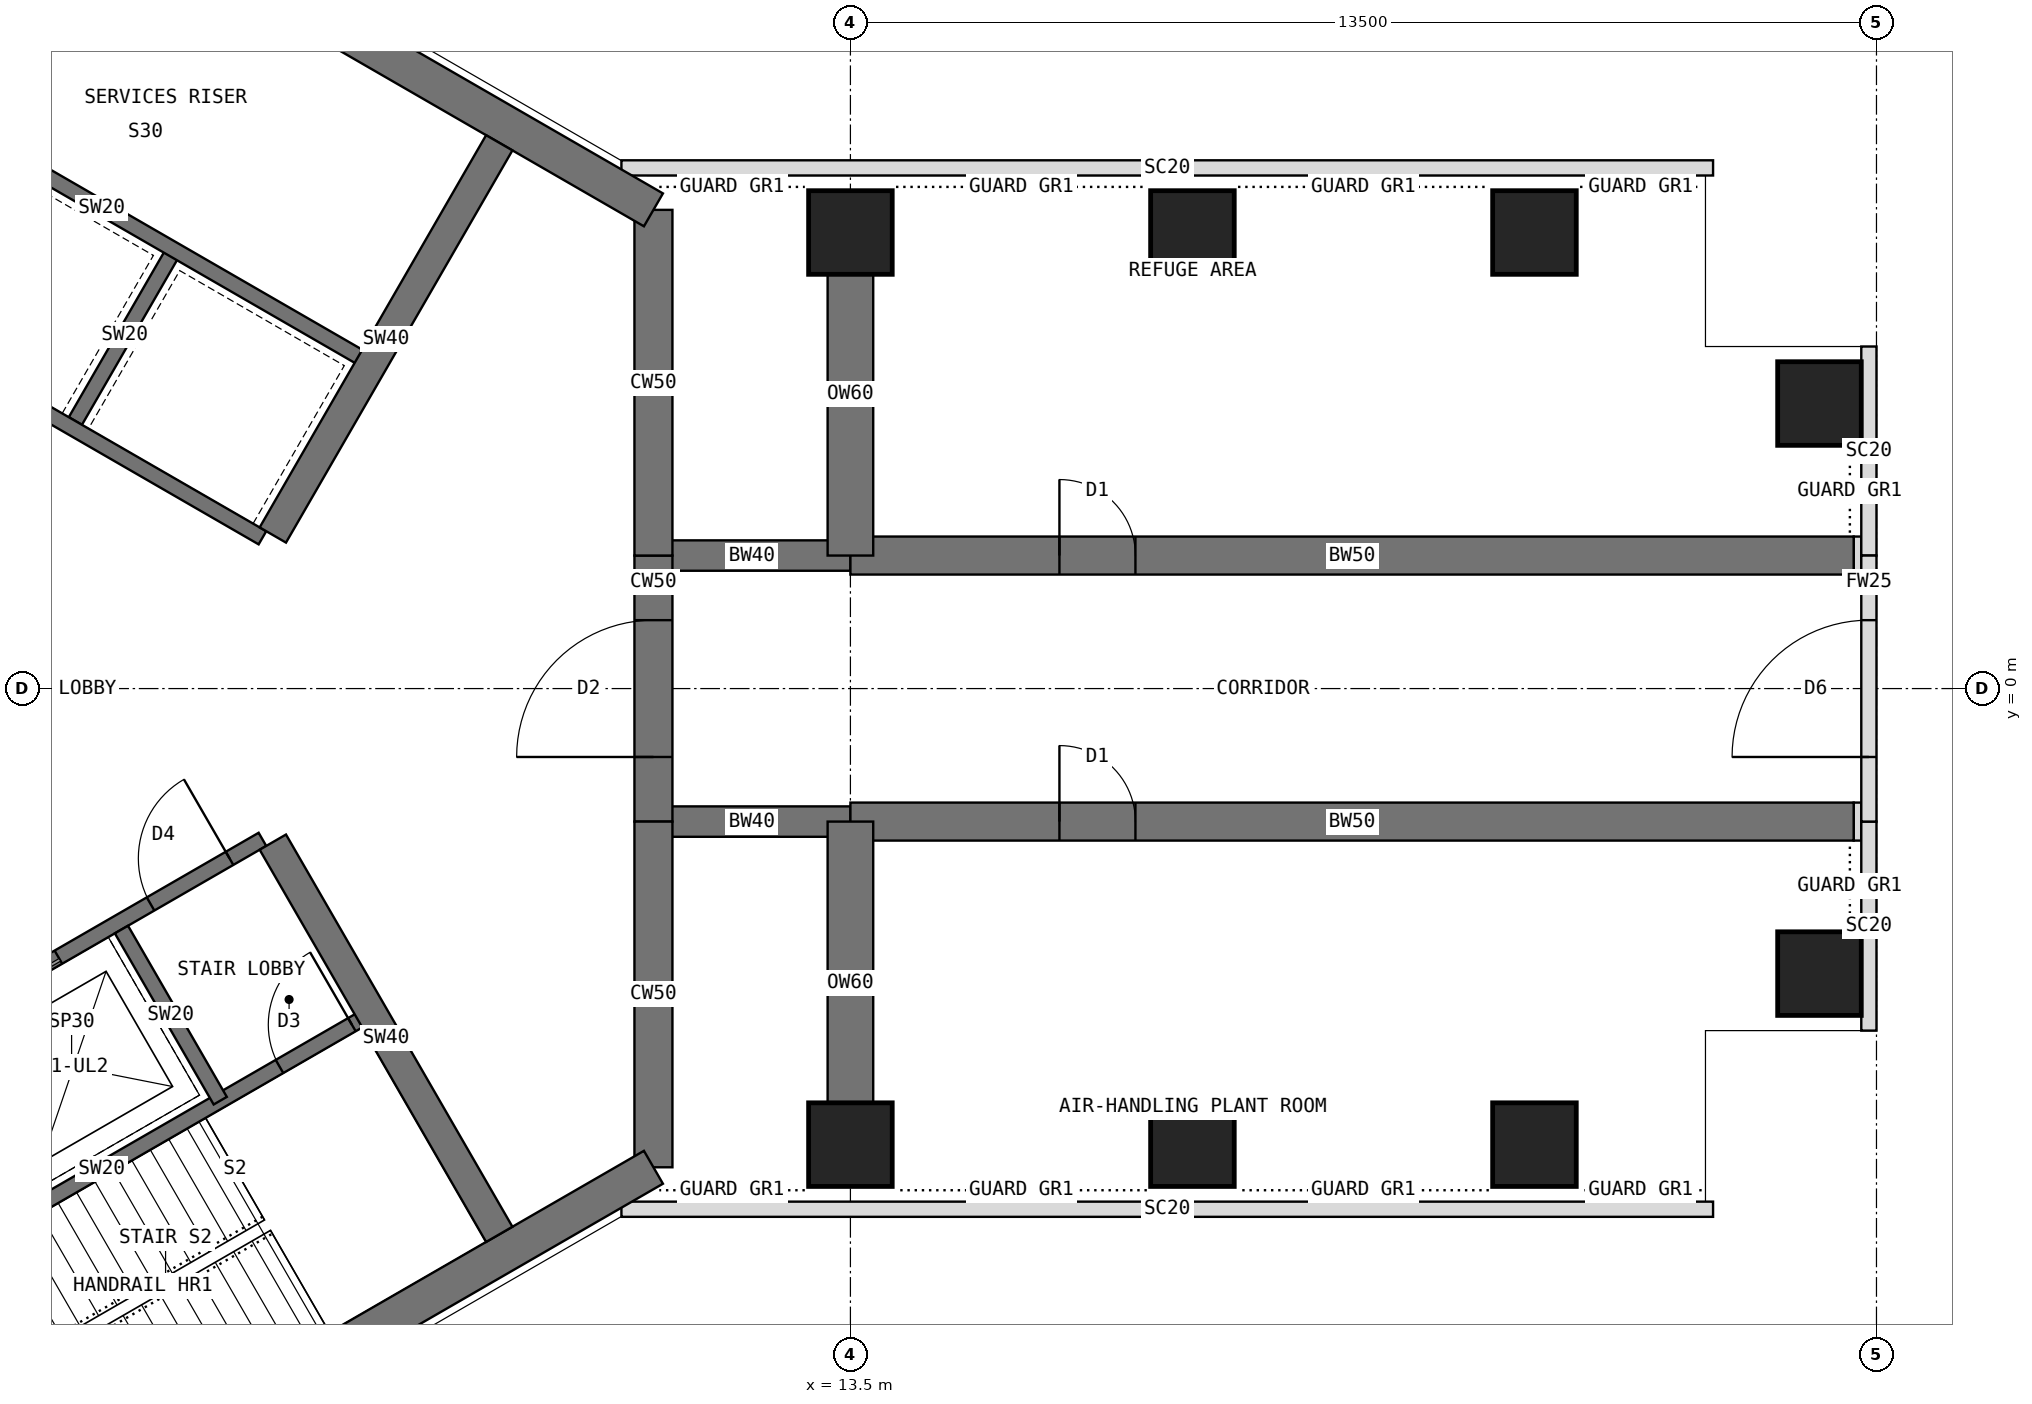
"""IFC4 building model, lengths in metres.
Left out: names, types, materials, properties, quantities, classifications, styles, units other than length and angle.
Written with IfcOpenShell. Run it as: python <this file> out.ifc"""

import sys

from ifc_helpers import new_model, si_unit, direction, frame, frame_2d, origin, origin_2d, place, context, subcontext, project, spatial, rectangle, extrude, element, fill, save


model = new_model("IFC4")
c1 = context("Model", 3, precision=1e-05, world=origin(), true_north=direction((0.0, 1.0)))
c2 = subcontext(c1, "Body", "Model", "MODEL_VIEW")
j1 = project(units=[si_unit("LENGTHUNIT", "METRE"), si_unit("PLANEANGLEUNIT", "RADIAN")], contexts=[c1])
p1 = place(None, origin())
s1 = spatial("IfcSite", under=j1, at=p1, CompositionType="ELEMENT")
p2 = place(p1, origin())
s2 = spatial("IfcBuilding", under=s1, at=p2, CompositionType="ELEMENT")
p3 = place(p2, frame((0.0, 0.0, 238.5)))
s3 = spatial("IfcBuildingStorey", under=s2, at=p3, CompositionType="ELEMENT", Elevation=238.5)
p4 = place(p3, frame((10.908, -6.298, 0.0), z_axis=(0.0, 0.0, 1.0), x_axis=(0.0, 1.0, 0.0)))
e1 = element("IfcWall", 1, at=p4, inside=s3, PredefinedType="SHEAR", context=c2, shape_type="SweptSolid", body=[
    extrude(rectangle(XDim=4.548, YDim=0.5, at=frame_2d((2.274, 0.0))), origin(), (0.0, 0.0, 1.0), 5.0),
])
p5 = place(p3, frame((10.908, -1.75, 0.0), z_axis=(0.0, 0.0, 1.0), x_axis=(0.0, 1.0, 0.0)))
e2 = element("IfcWall", 2, at=p5, inside=s3, PredefinedType="SHEAR", context=c2, shape_type="SweptSolid", body=[
    extrude(rectangle(XDim=3.5, YDim=0.5, at=frame_2d((1.75, 0.0))), origin(), (0.0, 0.0, 1.0), 5.0),
])
p6 = place(p5, frame((0.85, 0.0, 0.0)))
e3 = element("IfcOpeningElement", 3, at=p6, cuts=e2, PredefinedType="OPENING", context=c2, shape_type="SweptSolid", body=[
    extrude(rectangle(XDim=1.8, YDim=2.1, at=frame_2d((0.9, 1.05))), frame((0.0, 0.26, 0.0), z_axis=(0.0, -1.0, 0.0), x_axis=(1.0, 0.0, 0.0)), (0.0, 0.0, 1.0), 0.52),
])
p7 = place(p3, frame((10.908, 1.75, 0.0), z_axis=(0.0, 0.0, 1.0), x_axis=(0.0, 1.0, 0.0)))
e4 = element("IfcWall", 4, at=p7, inside=s3, PredefinedType="SHEAR", context=c2, shape_type="SweptSolid", body=[
    extrude(rectangle(XDim=4.548, YDim=0.5, at=frame_2d((2.274, 0.0))), origin(), (0.0, 0.0, 1.0), 5.0),
])
for number, where, z_axis, x_axis in (
    (5, (10.908, 6.298, 0.0), (0.0, 0.0, 1.0), (-0.866, 0.5, 0.0)),
    (6, (0.0, -12.596, 0.0), (0.0, 0.0, 1.0), (0.866, 0.5, 0.0)),
):
    element("IfcWall", number, at=place(p3, frame(where, z_axis=z_axis, x_axis=x_axis)), inside=s3, PredefinedType="SHEAR", context=c2, shape_type="SweptSolid", body=[
        extrude(rectangle(XDim=12.596, YDim=0.5, at=frame_2d((6.298, 0.0))), origin(), (0.0, 0.0, 1.0), 5.0),
    ])
p8 = place(p3, frame((10.908, 1.75, 0.0), z_axis=(0.0, 0.0, 1.0), x_axis=(1.0, 0.0, 0.0)))
e7 = element("IfcWall", 7, at=p8, inside=s3, PredefinedType="SHEAR", context=c2, shape_type="SweptSolid", body=[
    extrude(rectangle(XDim=2.592, YDim=0.4, at=frame_2d((1.296, 0.0))), origin(), (0.0, 0.0, 1.0), 5.0),
])
p9 = place(p3, frame((13.5, 1.75, 0.0), z_axis=(0.0, 0.0, 1.0), x_axis=(1.0, 0.0, 0.0)))
e8 = element("IfcWall", 8, at=p9, inside=s3, PredefinedType="SHEAR", context=c2, shape_type="SweptSolid", body=[
    extrude(rectangle(XDim=13.2, YDim=0.5, at=frame_2d((6.6, 0.0))), origin(), (0.0, 0.0, 1.0), 5.0),
])
p10 = place(p9, frame((2.75, 0.0, 0.0)))
e9 = element("IfcOpeningElement", 9, at=p10, cuts=e8, PredefinedType="OPENING", context=c2, shape_type="SweptSolid", body=[
    extrude(rectangle(XDim=1.0, YDim=2.1, at=frame_2d((0.5, 1.05))), frame((0.0, 0.26, 0.0), z_axis=(0.0, -1.0, 0.0), x_axis=(1.0, 0.0, 0.0)), (0.0, 0.0, 1.0), 0.52),
])
p11 = place(p3, frame((10.908, -1.75, 0.0), z_axis=(0.0, 0.0, 1.0), x_axis=(1.0, 0.0, 0.0)))
e10 = element("IfcWall", 10, at=p11, inside=s3, PredefinedType="SHEAR", context=c2, shape_type="SweptSolid", body=[
    extrude(rectangle(XDim=2.592, YDim=0.4, at=frame_2d((1.296, 0.0))), origin(), (0.0, 0.0, 1.0), 5.0),
])
p12 = place(p3, frame((13.5, -1.75, 0.0), z_axis=(0.0, 0.0, 1.0), x_axis=(1.0, 0.0, 0.0)))
e11 = element("IfcWall", 11, at=p12, inside=s3, PredefinedType="SHEAR", context=c2, shape_type="SweptSolid", body=[
    extrude(rectangle(XDim=13.2, YDim=0.5, at=frame_2d((6.6, 0.0))), origin(), (0.0, 0.0, 1.0), 5.0),
])
p13 = place(p12, frame((2.75, 0.0, 0.0)))
e12 = element("IfcOpeningElement", 12, at=p13, cuts=e11, PredefinedType="OPENING", context=c2, shape_type="SweptSolid", body=[
    extrude(rectangle(XDim=1.0, YDim=2.1, at=frame_2d((0.5, 1.05))), frame((0.0, 0.26, 0.0), z_axis=(0.0, -1.0, 0.0), x_axis=(1.0, 0.0, 0.0)), (0.0, 0.0, 1.0), 0.52),
])
for number, where, z_axis, x_axis in (
    (13, (13.5, 6.0, 0.0), (0.0, 0.0, 1.0), (1.0, 0.0, 0.0)),
    (14, (13.5, -6.0, 0.0), (0.0, 0.0, 1.0), (1.0, 0.0, 0.0)),
    (15, (18.0, 6.0, 0.0), (0.0, 0.0, 1.0), (1.0, 0.0, 0.0)),
    (16, (18.0, -6.0, 0.0), (0.0, 0.0, 1.0), (1.0, 0.0, 0.0)),
    (17, (22.5, 6.0, 0.0), (0.0, 0.0, 1.0), (1.0, 0.0, 0.0)),
    (18, (22.5, -6.0, 0.0), (0.0, 0.0, 1.0), (1.0, 0.0, 0.0)),
    (19, (26.25, 3.75, 0.0), (0.0, 0.0, 1.0), (1.0, 0.0, 0.0)),
    (20, (26.25, -3.75, 0.0), (0.0, 0.0, 1.0), (1.0, 0.0, 0.0)),
):
    element("IfcColumn", number, at=place(p3, frame(where, z_axis=z_axis, x_axis=x_axis)), inside=s3, PredefinedType="COLUMN", context=c2, shape_type="SweptSolid", body=[
        extrude(rectangle(XDim=1.1, YDim=1.1, at=origin_2d()), origin(), (0.0, 0.0, 1.0), 5.0),
    ])
for number, where, z_axis, x_axis in (
    (21, (13.5, 1.75, 0.0), (0.0, 0.0, 1.0), (0.0, 1.0, 0.0)),
    (22, (13.5, -1.75, 0.0), (0.0, 0.0, 1.0), (0.0, -1.0, 0.0)),
):
    element("IfcWall", number, at=place(p3, frame(where, z_axis=z_axis, x_axis=x_axis)), inside=s3, PredefinedType="SHEAR", context=c2, shape_type="SweptSolid", body=[
        extrude(rectangle(XDim=4.25, YDim=0.6, at=frame_2d((2.125, 0.0))), origin(), (0.0, 0.0, 1.0), 5.0),
    ])
for number, where, z_axis, x_axis in (
    (23, (10.487, 6.85, 0.0), (0.0, 0.0, 1.0), (1.0, 0.0, 0.0)),
    (24, (24.85, -6.85, 0.0), (0.0, 0.0, 1.0), (-1.0, 0.0, 0.0)),
):
    element("IfcWall", number, at=place(p3, frame(where, z_axis=z_axis, x_axis=x_axis)), inside=s3, PredefinedType="USERDEFINED", context=c2, shape_type="SweptSolid", body=[
        extrude(rectangle(XDim=14.363, YDim=0.2, at=frame_2d((7.182, 0.0))), origin(), (0.0, 0.0, 1.0), 4.8),
    ])
p14 = place(p3, frame((26.9, -4.5, 0.0), z_axis=(0.0, 0.0, 1.0), x_axis=(0.0, 1.0, 0.0)))
e25 = element("IfcWall", 25, at=p14, inside=s3, PredefinedType="USERDEFINED", context=c2, shape_type="SweptSolid", body=[
    extrude(rectangle(XDim=2.75, YDim=0.2, at=frame_2d((1.375, 0.0))), origin(), (0.0, 0.0, 1.0), 4.8),
])
p15 = place(p3, frame((26.9, -1.75, 0.0), z_axis=(0.0, 0.0, 1.0), x_axis=(0.0, 1.0, 0.0)))
e26 = element("IfcWall", 26, at=p15, inside=s3, PredefinedType="STANDARD", context=c2, shape_type="SweptSolid", body=[
    extrude(rectangle(XDim=3.5, YDim=0.2, at=frame_2d((1.75, 0.0))), origin(), (0.0, 0.0, 1.0), 4.8),
])
p16 = place(p15, frame((0.85, 0.0, 0.0)))
e27 = element("IfcOpeningElement", 27, at=p16, cuts=e26, PredefinedType="OPENING", context=c2, shape_type="SweptSolid", body=[
    extrude(rectangle(XDim=1.8, YDim=2.4, at=frame_2d((0.9, 1.2))), frame((0.0, 0.11, 0.0), z_axis=(0.0, -1.0, 0.0), x_axis=(1.0, 0.0, 0.0)), (0.0, 0.0, 1.0), 0.22),
])
p17 = place(p3, frame((26.9, 1.75, 0.0), z_axis=(0.0, 0.0, 1.0), x_axis=(0.0, 1.0, 0.0)))
e28 = element("IfcWall", 28, at=p17, inside=s3, PredefinedType="USERDEFINED", context=c2, shape_type="SweptSolid", body=[
    extrude(rectangle(XDim=2.75, YDim=0.2, at=frame_2d((1.375, 0.0))), origin(), (0.0, 0.0, 1.0), 4.8),
])
for number, where, z_axis, x_axis in (
    (29, (26.7, 1.75, 0.0), (0.0, 0.0, 1.0), (1.0, 0.0, 0.0)),
    (30, (26.7, -1.75, 0.0), (0.0, 0.0, 1.0), (1.0, 0.0, 0.0)),
):
    element("IfcWall", number, at=place(p3, frame(where, z_axis=z_axis, x_axis=x_axis)), inside=s3, PredefinedType="PARTITIONING", context=c2, shape_type="SweptSolid", body=[
        extrude(rectangle(XDim=0.1, YDim=0.5, at=frame_2d((0.05, 0.0))), origin(), (0.0, 0.0, 1.0), 4.8),
    ])
p18 = place(p3, frame((5.764, 1.984, 0.0), z_axis=(0.0, 0.0, 1.0), x_axis=(-0.866026010844, 0.49999894854, 0.0)))
e31 = element("IfcWall", 31, at=p18, inside=s3, PredefinedType="SHEAR", context=c2, shape_type="SweptSolid", body=[
    extrude(rectangle(XDim=8.0, YDim=0.2, at=frame_2d((4.0, 0.0))), origin(), (0.0, 0.0, 1.0), 5.0),
])
p19 = place(p18, frame((6.3, 0.0, 0.0)))
e32 = element("IfcOpeningElement", 32, at=p19, cuts=e31, PredefinedType="OPENING", context=c2, shape_type="SweptSolid", body=[
    extrude(rectangle(XDim=1.2, YDim=2.1, at=frame_2d((0.6, 1.05))), frame((0.0, 0.11, 0.0), z_axis=(0.0, -1.0, 0.0), x_axis=(1.0, 0.0, 0.0)), (0.0, 0.0, 1.0), 0.22),
])
p20 = place(p3, frame((3.303, 3.52, 0.0), z_axis=(0.0, 0.0, 1.0), x_axis=(0.499936506574, 0.866062058628, 0.0)))
e33 = element("IfcWall", 33, at=p20, inside=s3, PredefinedType="SHEAR", context=c2, shape_type="SweptSolid", body=[
    extrude(rectangle(XDim=2.6, YDim=0.2, at=frame_2d((1.3, 0.0))), origin(), (0.0, 0.0, 1.0), 5.0),
])
p21 = place(p3, frame((7.114, 4.322, 0.0), z_axis=(0.0, 0.0, 1.0), x_axis=(-0.866026010844, 0.49999894854, 0.0)))
e34 = element("IfcWall", 34, at=p21, inside=s3, PredefinedType="SHEAR", context=c2, shape_type="SweptSolid", body=[
    extrude(rectangle(XDim=8.0, YDim=0.2, at=frame_2d((4.0, 0.0))), origin(), (0.0, 0.0, 1.0), 5.0),
])
p22 = place(p21, frame((6.8, 0.0, 0.0)))
e35 = element("IfcOpeningElement", 35, at=p22, cuts=e34, PredefinedType="OPENING", context=c2, shape_type="SweptSolid", body=[
    extrude(rectangle(XDim=0.9, YDim=2.1, at=frame_2d((0.45, 1.05))), frame((0.0, 0.11, 0.0), z_axis=(0.0, -1.0, 0.0), x_axis=(1.0, 0.0, 0.0)), (0.0, 0.0, 1.0), 0.22),
])
p23 = place(p3, frame((5.901, 2.02, 0.0), z_axis=(0.0, 0.0, 1.0), x_axis=(0.500003832394, 0.86602319114, 0.0)))
e36 = element("IfcWall", 36, at=p23, inside=s3, PredefinedType="SHEAR", context=c2, shape_type="SweptSolid", body=[
    extrude(rectangle(XDim=5.958, YDim=0.4, at=frame_2d((2.979, 0.0))), origin(), (0.0, 0.0, 1.0), 5.0),
])
p24 = place(p3, frame((-1.164, -5.984, 0.0), z_axis=(0.0, 0.0, 1.0), x_axis=(0.866026010844, 0.49999894854, 0.0)))
e37 = element("IfcWall", 37, at=p24, inside=s3, PredefinedType="SHEAR", context=c2, shape_type="SweptSolid", body=[
    extrude(rectangle(XDim=8.0, YDim=0.2, at=frame_2d((4.0, 0.0))), origin(), (0.0, 0.0, 1.0), 5.0),
])
p25 = place(p24, frame((6.3, 0.0, 0.0)))
e38 = element("IfcOpeningElement", 38, at=p25, cuts=e37, PredefinedType="OPENING", context=c2, shape_type="SweptSolid", body=[
    extrude(rectangle(XDim=1.2, YDim=2.1, at=frame_2d((0.6, 1.05))), frame((0.0, 0.11, 0.0), z_axis=(0.0, -1.0, 0.0), x_axis=(1.0, 0.0, 0.0)), (0.0, 0.0, 1.0), 0.22),
])
p26 = place(p24, frame((0.9, 0.0, 0.0)))
e39 = element("IfcOpeningElement", 39, at=p26, cuts=e37, PredefinedType="OPENING", context=c2, shape_type="SweptSolid", body=[
    extrude(rectangle(XDim=1.1, YDim=2.2, at=frame_2d((0.55, 1.1))), frame((0.0, 0.11, 0.0), z_axis=(0.0, -1.0, 0.0), x_axis=(1.0, 0.0, 0.0)), (0.0, 0.0, 1.0), 0.22),
])
p27 = place(p24, frame((3.8, 0.0, 0.0)))
e40 = element("IfcOpeningElement", 40, at=p27, cuts=e37, PredefinedType="OPENING", context=c2, shape_type="SweptSolid", body=[
    extrude(rectangle(XDim=1.1, YDim=2.2, at=frame_2d((0.55, 1.1))), frame((0.0, 0.11, 0.0), z_axis=(0.0, -1.0, 0.0), x_axis=(1.0, 0.0, 0.0)), (0.0, 0.0, 1.0), 0.22),
])
p28 = place(p3, frame((3.909, -3.17, 0.0), z_axis=(0.0, 0.0, 1.0), x_axis=(0.49997716683, -0.86603858612, 0.0)))
e41 = element("IfcWall", 41, at=p28, inside=s3, PredefinedType="SHEAR", context=c2, shape_type="SweptSolid", body=[
    extrude(rectangle(XDim=2.6, YDim=0.2, at=frame_2d((1.3, 0.0))), origin(), (0.0, 0.0, 1.0), 5.0),
])
p29 = place(p3, frame((0.186, -8.322, 0.0), z_axis=(0.0, 0.0, 1.0), x_axis=(0.866026010844, 0.49999894854, 0.0)))
e42 = element("IfcWall", 42, at=p29, inside=s3, PredefinedType="SHEAR", context=c2, shape_type="SweptSolid", body=[
    extrude(rectangle(XDim=8.0, YDim=0.2, at=frame_2d((4.0, 0.0))), origin(), (0.0, 0.0, 1.0), 5.0),
])
p30 = place(p29, frame((6.7, 0.0, 0.0)))
e43 = element("IfcOpeningElement", 43, at=p30, cuts=e42, PredefinedType="OPENING", context=c2, shape_type="SweptSolid", body=[
    extrude(rectangle(XDim=1.1, YDim=2.1, at=frame_2d((0.55, 1.05))), frame((0.0, 0.11, 0.0), z_axis=(0.0, -1.0, 0.0), x_axis=(1.0, 0.0, 0.0)), (0.0, 0.0, 1.0), 0.22),
])
p31 = place(p3, frame((5.901, -2.02, 0.0), z_axis=(0.0, 0.0, 1.0), x_axis=(0.500003832394, -0.86602319114, 0.0)))
e44 = element("IfcWall", 44, at=p31, inside=s3, PredefinedType="SHEAR", context=c2, shape_type="SweptSolid", body=[
    extrude(rectangle(XDim=5.958, YDim=0.4, at=frame_2d((2.979, 0.0))), origin(), (0.0, 0.0, 1.0), 5.0),
])
p32 = place(p16, origin())
e45 = element("IfcDoor", 45, at=p32, inside=s3, OperationType="DOUBLE_DOOR_DOUBLE_SWING", PredefinedType="DOOR", context=c2, shape_type="SweptSolid", body=[
    extrude(rectangle(XDim=1.8, YDim=2.4, at=frame_2d((0.9, 1.2))), frame((0.0, 0.025, 0.0), z_axis=(0.0, -1.0, 0.0), x_axis=(1.0, 0.0, 0.0)), (0.0, 0.0, 1.0), 0.05),
])
fill(e27, e45)
p33 = place(p25, origin())
e46 = element("IfcDoor", 46, at=p33, inside=s3, OperationType="SINGLE_SWING_RIGHT", PredefinedType="DOOR", context=c2, shape_type="SweptSolid", body=[
    extrude(rectangle(XDim=1.2, YDim=2.1, at=frame_2d((0.6, 1.05))), frame((0.0, 0.025, 0.0), z_axis=(0.0, -1.0, 0.0), x_axis=(1.0, 0.0, 0.0)), (0.0, 0.0, 1.0), 0.05),
])
fill(e38, e46)
p34 = place(p27, origin())
e47 = element("IfcDoor", 47, at=p34, inside=s3, OperationType="DOUBLE_DOOR_SLIDING", PredefinedType="DOOR", context=c2, shape_type="SweptSolid", body=[
    extrude(rectangle(XDim=1.1, YDim=2.2, at=frame_2d((0.55, 1.1))), frame((0.0, 0.025, 0.0), z_axis=(0.0, -1.0, 0.0), x_axis=(1.0, 0.0, 0.0)), (0.0, 0.0, 1.0), 0.05),
])
fill(e40, e47)
p35 = place(p30, origin())
e48 = element("IfcDoor", 48, at=p35, inside=s3, OperationType="SINGLE_SWING_RIGHT", PredefinedType="DOOR", context=c2, shape_type="SweptSolid", body=[
    extrude(rectangle(XDim=1.1, YDim=2.1, at=frame_2d((0.55, 1.05))), frame((0.0, 0.025, 0.0), z_axis=(0.0, -1.0, 0.0), x_axis=(1.0, 0.0, 0.0)), (0.0, 0.0, 1.0), 0.05),
])
fill(e43, e48)
p36 = place(p6, origin())
e49 = element("IfcDoor", 49, at=p36, inside=s3, OperationType="DOUBLE_DOOR_DOUBLE_SWING", PredefinedType="DOOR", context=c2, shape_type="SweptSolid", body=[
    extrude(rectangle(XDim=1.8, YDim=2.1, at=frame_2d((0.9, 1.05))), frame((0.0, 0.025, 0.0), z_axis=(0.0, -1.0, 0.0), x_axis=(1.0, 0.0, 0.0)), (0.0, 0.0, 1.0), 0.05),
])
fill(e3, e49)
p37 = place(p10, origin())
e50 = element("IfcDoor", 50, at=p37, inside=s3, OperationType="SINGLE_SWING_LEFT", PredefinedType="DOOR", context=c2, shape_type="SweptSolid", body=[
    extrude(rectangle(XDim=1.0, YDim=2.1, at=frame_2d((0.5, 1.05))), frame((0.0, 0.025, 0.0), z_axis=(0.0, -1.0, 0.0), x_axis=(1.0, 0.0, 0.0)), (0.0, 0.0, 1.0), 0.05),
])
fill(e9, e50)
p38 = place(p13, origin())
e51 = element("IfcDoor", 51, at=p38, inside=s3, OperationType="SINGLE_SWING_LEFT", PredefinedType="DOOR", context=c2, shape_type="SweptSolid", body=[
    extrude(rectangle(XDim=1.0, YDim=2.1, at=frame_2d((0.5, 1.05))), frame((0.0, 0.025, 0.0), z_axis=(0.0, -1.0, 0.0), x_axis=(1.0, 0.0, 0.0)), (0.0, 0.0, 1.0), 0.05),
])
fill(e12, e51)
save(model, sys.argv[1])
